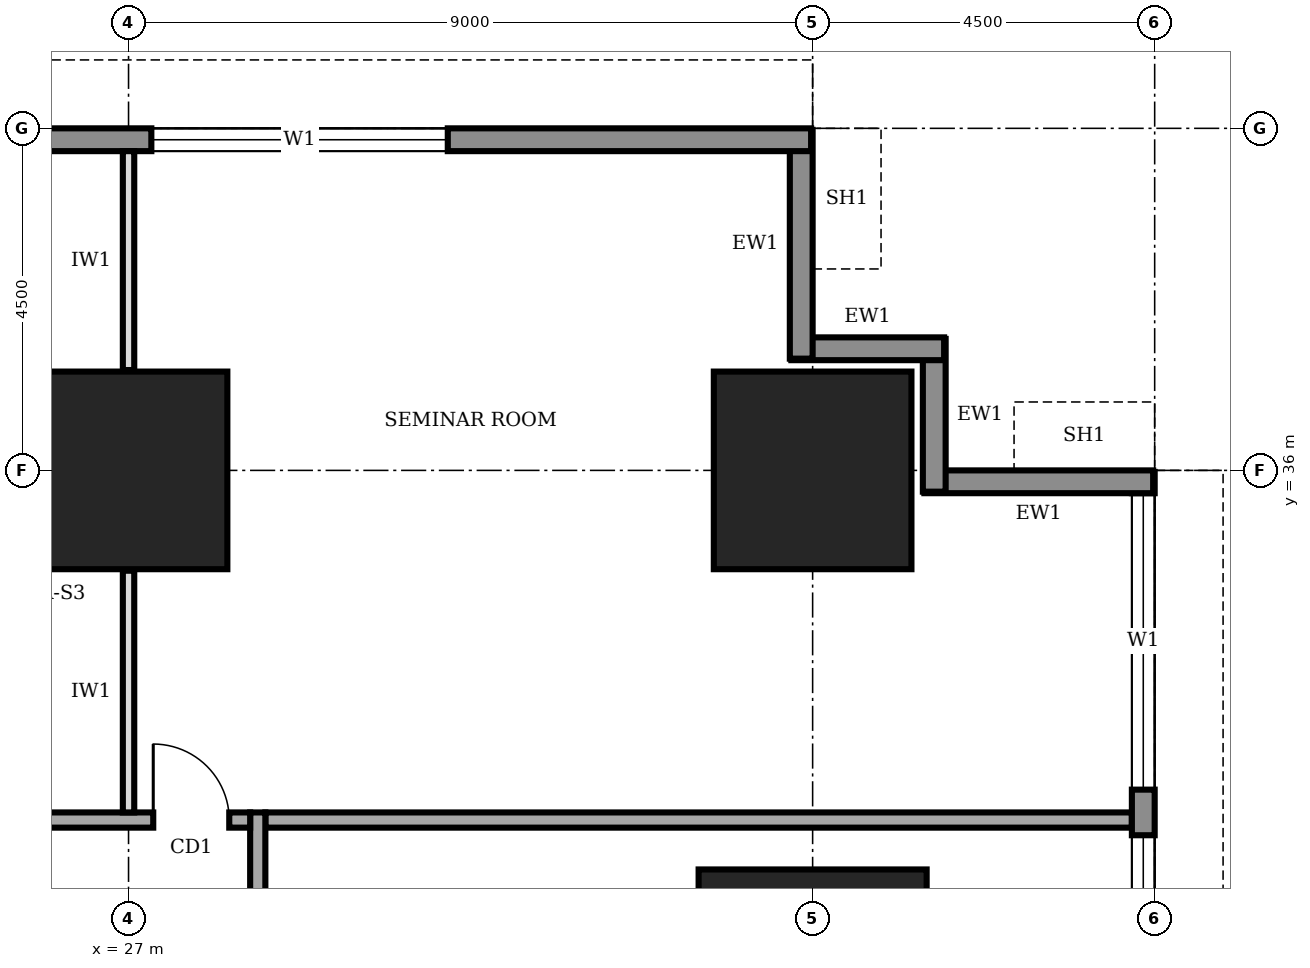
"""IFC4 building model, lengths in metres.
Left out: names, types, materials, properties, quantities, classifications, styles, units other than length and angle.
Written with IfcOpenShell. Run it as: python <this file> out.ifc"""

import sys

from ifc_helpers import new_model, si_unit, direction, frame, frame_2d, origin, origin_2d, place, context, subcontext, project, spatial, rectangle, extrude, element, fill, save


model = new_model("IFC4")
c1 = context("Model", 3, precision=1e-05, world=origin(), true_north=direction((0.0, 1.0)))
c2 = subcontext(c1, "Body", "Model", "MODEL_VIEW")
j1 = project(units=[si_unit("LENGTHUNIT", "METRE"), si_unit("PLANEANGLEUNIT", "RADIAN")], contexts=[c1])
p1 = place(None, origin())
s1 = spatial("IfcSite", under=j1, at=p1, CompositionType="ELEMENT")
p2 = place(p1, origin())
s2 = spatial("IfcBuilding", under=s1, at=p2, CompositionType="ELEMENT")
p3 = place(p2, frame((0.0, 0.0, 25.0)))
s3 = spatial("IfcBuildingStorey", under=s2, at=p3, CompositionType="ELEMENT", Elevation=25.0)
p4 = place(p3, frame((36.0, 29.25, 0.0), z_axis=(0.0, 0.0, 1.0), x_axis=(1.0, 0.0, 0.0)))
e1 = element("IfcColumn", 1, at=p4, inside=s3, PredefinedType="COLUMN", context=c2, shape_type="SweptSolid", body=[
    extrude(rectangle(XDim=3.0, YDim=3.0, at=origin_2d()), origin(), (0.0, 0.0, 1.0), 4.0),
])
for number, where, z_axis, x_axis in (
    (2, (27.0, 36.0, 0.0), (0.0, 0.0, 1.0), (1.0, 0.0, 0.0)),
    (3, (36.0, 36.0, 0.0), (0.0, 0.0, 1.0), (1.0, 0.0, 0.0)),
):
    element("IfcColumn", number, at=place(p3, frame(where, z_axis=z_axis, x_axis=x_axis)), inside=s3, PredefinedType="COLUMN", context=c2, shape_type="SweptSolid", body=[
        extrude(rectangle(XDim=2.6, YDim=2.6, at=origin_2d()), origin(), (0.0, 0.0, 1.0), 4.0),
    ])
p5 = place(p3, frame((40.35, 4.52, 0.0), z_axis=(0.0, 0.0, 1.0), x_axis=(0.0, 1.0, 0.0)))
e4 = element("IfcWall", 4, at=p5, inside=s3, PredefinedType="STANDARD", context=c2, shape_type="SweptSolid", body=[
    extrude(rectangle(XDim=31.46, YDim=0.3, at=frame_2d((15.73, 0.0))), origin(), (0.0, 0.0, 1.0), 3.75),
])
p6 = place(p5, frame((4.78, 0.0, 0.9)))
e5 = element("IfcOpeningElement", 5, at=p6, cuts=e4, PredefinedType="OPENING", context=c2, shape_type="SweptSolid", body=[
    extrude(rectangle(XDim=3.9, YDim=2.2, at=frame_2d((1.95, 1.1))), frame((0.0, 0.16, 0.0), z_axis=(0.0, -1.0, 0.0), x_axis=(1.0, 0.0, 0.0)), (0.0, 0.0, 1.0), 0.32),
])
p7 = place(p5, frame((9.28, 0.0, 0.9)))
e6 = element("IfcOpeningElement", 6, at=p7, cuts=e4, PredefinedType="OPENING", context=c2, shape_type="SweptSolid", body=[
    extrude(rectangle(XDim=3.9, YDim=2.2, at=frame_2d((1.95, 1.1))), frame((0.0, 0.16, 0.0), z_axis=(0.0, -1.0, 0.0), x_axis=(1.0, 0.0, 0.0)), (0.0, 0.0, 1.0), 0.32),
])
p8 = place(p5, frame((13.78, 0.0, 0.9)))
e7 = element("IfcOpeningElement", 7, at=p8, cuts=e4, PredefinedType="OPENING", context=c2, shape_type="SweptSolid", body=[
    extrude(rectangle(XDim=3.9, YDim=2.2, at=frame_2d((1.95, 1.1))), frame((0.0, 0.16, 0.0), z_axis=(0.0, -1.0, 0.0), x_axis=(1.0, 0.0, 0.0)), (0.0, 0.0, 1.0), 0.32),
])
p9 = place(p5, frame((18.28, 0.0, 0.9)))
e8 = element("IfcOpeningElement", 8, at=p9, cuts=e4, PredefinedType="OPENING", context=c2, shape_type="SweptSolid", body=[
    extrude(rectangle(XDim=3.9, YDim=2.2, at=frame_2d((1.95, 1.1))), frame((0.0, 0.16, 0.0), z_axis=(0.0, -1.0, 0.0), x_axis=(1.0, 0.0, 0.0)), (0.0, 0.0, 1.0), 0.32),
])
p10 = place(p5, frame((22.78, 0.0, 0.9)))
e9 = element("IfcOpeningElement", 9, at=p10, cuts=e4, PredefinedType="OPENING", context=c2, shape_type="SweptSolid", body=[
    extrude(rectangle(XDim=3.9, YDim=2.2, at=frame_2d((1.95, 1.1))), frame((0.0, 0.16, 0.0), z_axis=(0.0, -1.0, 0.0), x_axis=(1.0, 0.0, 0.0)), (0.0, 0.0, 1.0), 0.32),
])
p11 = place(p5, frame((27.28, 0.0, 0.9)))
e10 = element("IfcOpeningElement", 10, at=p11, cuts=e4, PredefinedType="OPENING", context=c2, shape_type="SweptSolid", body=[
    extrude(rectangle(XDim=3.9, YDim=2.2, at=frame_2d((1.95, 1.1))), frame((0.0, 0.16, 0.0), z_axis=(0.0, -1.0, 0.0), x_axis=(1.0, 0.0, 0.0)), (0.0, 0.0, 1.0), 0.32),
])
p12 = place(p3, frame((40.48, 35.85, 0.0), z_axis=(0.0, 0.0, 1.0), x_axis=(-1.0, 0.0, 0.0)))
e11 = element("IfcWall", 11, at=p12, inside=s3, PredefinedType="STANDARD", context=c2, shape_type="SweptSolid", body=[
    extrude(rectangle(XDim=3.01, YDim=0.3, at=frame_2d((1.505, 0.0))), origin(), (0.0, 0.0, 1.0), 2.85),
])
for number, where, z_axis, x_axis in (
    (12, (37.6, 35.72, 0.0), (0.0, 0.0, 1.0), (0.0, 1.0, 0.0)),
    (13, (37.73, 37.6, 0.0), (0.0, 0.0, 1.0), (-1.0, 0.0, 0.0)),
):
    element("IfcWall", number, at=place(p3, frame(where, z_axis=z_axis, x_axis=x_axis)), inside=s3, PredefinedType="STANDARD", context=c2, shape_type="SweptSolid", body=[
        extrude(rectangle(XDim=2.01, YDim=0.3, at=frame_2d((1.005, 0.0))), origin(), (0.0, 0.0, 1.0), 3.75),
    ])
p13 = place(p3, frame((35.85, 37.47, 0.0), z_axis=(0.0, 0.0, 1.0), x_axis=(0.0, 1.0, 0.0)))
e14 = element("IfcWall", 14, at=p13, inside=s3, PredefinedType="STANDARD", context=c2, shape_type="SweptSolid", body=[
    extrude(rectangle(XDim=3.01, YDim=0.3, at=frame_2d((1.505, 0.0))), origin(), (0.0, 0.0, 1.0), 2.85),
])
p14 = place(p3, frame((35.98, 40.35, 0.0), z_axis=(0.0, 0.0, 1.0), x_axis=(-1.0, 0.0, 0.0)))
e15 = element("IfcWall", 15, at=p14, inside=s3, PredefinedType="STANDARD", context=c2, shape_type="SweptSolid", body=[
    extrude(rectangle(XDim=31.46, YDim=0.3, at=frame_2d((15.73, 0.0))), origin(), (0.0, 0.0, 1.0), 3.75),
])
p15 = place(p14, frame((27.28, 0.0, 0.9)))
e16 = element("IfcOpeningElement", 16, at=p15, cuts=e15, PredefinedType="OPENING", context=c2, shape_type="SweptSolid", body=[
    extrude(rectangle(XDim=3.9, YDim=2.2, at=frame_2d((1.95, 1.1))), frame((0.0, 0.16, 0.0), z_axis=(0.0, -1.0, 0.0), x_axis=(1.0, 0.0, 0.0)), (0.0, 0.0, 1.0), 0.32),
])
p16 = place(p14, frame((22.78, 0.0, 0.9)))
e17 = element("IfcOpeningElement", 17, at=p16, cuts=e15, PredefinedType="OPENING", context=c2, shape_type="SweptSolid", body=[
    extrude(rectangle(XDim=3.9, YDim=2.2, at=frame_2d((1.95, 1.1))), frame((0.0, 0.16, 0.0), z_axis=(0.0, -1.0, 0.0), x_axis=(1.0, 0.0, 0.0)), (0.0, 0.0, 1.0), 0.32),
])
p17 = place(p14, frame((4.78, 0.0, 0.9)))
e18 = element("IfcOpeningElement", 18, at=p17, cuts=e15, PredefinedType="OPENING", context=c2, shape_type="SweptSolid", body=[
    extrude(rectangle(XDim=3.9, YDim=2.2, at=frame_2d((1.95, 1.1))), frame((0.0, 0.16, 0.0), z_axis=(0.0, -1.0, 0.0), x_axis=(1.0, 0.0, 0.0)), (0.0, 0.0, 1.0), 0.32),
])
p18 = place(p3, frame((28.7, 7.7, 0.0), z_axis=(0.0, 0.0, 1.0), x_axis=(0.0, 1.0, 0.0)))
e19 = element("IfcWall", 19, at=p18, inside=s3, PredefinedType="SOLIDWALL", context=c2, shape_type="SweptSolid", body=[
    extrude(rectangle(XDim=23.8, YDim=0.2, at=frame_2d((11.9, 0.0))), origin(), (0.0, 0.0, 1.0), 3.75),
])
p19 = place(p18, frame((2.3, 0.0, 0.0)))
e20 = element("IfcOpeningElement", 20, at=p19, cuts=e19, PredefinedType="OPENING", context=c2, shape_type="SweptSolid", body=[
    extrude(rectangle(XDim=1.0, YDim=2.1, at=frame_2d((0.5, 1.05))), frame((0.0, 0.11, 0.0), z_axis=(0.0, -1.0, 0.0), x_axis=(1.0, 0.0, 0.0)), (0.0, 0.0, 1.0), 0.22),
])
p20 = place(p18, frame((7.55, 0.0, 0.0)))
e21 = element("IfcOpeningElement", 21, at=p20, cuts=e19, PredefinedType="OPENING", context=c2, shape_type="SweptSolid", body=[
    extrude(rectangle(XDim=1.0, YDim=2.1, at=frame_2d((0.5, 1.05))), frame((0.0, 0.11, 0.0), z_axis=(0.0, -1.0, 0.0), x_axis=(1.0, 0.0, 0.0)), (0.0, 0.0, 1.0), 0.22),
])
p21 = place(p18, frame((12.05, 0.0, 0.0)))
e22 = element("IfcOpeningElement", 22, at=p21, cuts=e19, PredefinedType="OPENING", context=c2, shape_type="SweptSolid", body=[
    extrude(rectangle(XDim=1.0, YDim=2.1, at=frame_2d((0.5, 1.05))), frame((0.0, 0.11, 0.0), z_axis=(0.0, -1.0, 0.0), x_axis=(1.0, 0.0, 0.0)), (0.0, 0.0, 1.0), 0.22),
])
p22 = place(p18, frame((18.4, 0.0, 0.0)))
e23 = element("IfcOpeningElement", 23, at=p22, cuts=e19, PredefinedType="OPENING", context=c2, shape_type="SweptSolid", body=[
    extrude(rectangle(XDim=1.8, YDim=2.1, at=frame_2d((0.9, 1.05))), frame((0.0, 0.11, 0.0), z_axis=(0.0, -1.0, 0.0), x_axis=(1.0, 0.0, 0.0)), (0.0, 0.0, 1.0), 0.22),
])
p23 = place(p3, frame((28.6, 31.4, 0.0), z_axis=(0.0, 0.0, 1.0), x_axis=(-1.0, 0.0, 0.0)))
e24 = element("IfcWall", 24, at=p23, inside=s3, PredefinedType="SOLIDWALL", context=c2, shape_type="SweptSolid", body=[
    extrude(rectangle(XDim=16.9, YDim=0.2, at=frame_2d((8.45, 0.0))), origin(), (0.0, 0.0, 1.0), 3.75),
])
p24 = place(p23, frame((15.425, 0.0, 0.0)))
e25 = element("IfcOpeningElement", 25, at=p24, cuts=e24, PredefinedType="OPENING", context=c2, shape_type="SweptSolid", body=[
    extrude(rectangle(XDim=1.0, YDim=2.1, at=frame_2d((0.5, 1.05))), frame((0.0, 0.11, 0.0), z_axis=(0.0, -1.0, 0.0), x_axis=(1.0, 0.0, 0.0)), (0.0, 0.0, 1.0), 0.22),
])
p25 = place(p23, frame((12.35, 0.0, 0.0)))
e26 = element("IfcOpeningElement", 26, at=p25, cuts=e24, PredefinedType="OPENING", context=c2, shape_type="SweptSolid", body=[
    extrude(rectangle(XDim=1.0, YDim=2.1, at=frame_2d((0.5, 1.05))), frame((0.0, 0.11, 0.0), z_axis=(0.0, -1.0, 0.0), x_axis=(1.0, 0.0, 0.0)), (0.0, 0.0, 1.0), 0.22),
])
p26 = place(p23, frame((5.6, 0.0, 0.0)))
e27 = element("IfcOpeningElement", 27, at=p26, cuts=e24, PredefinedType="OPENING", context=c2, shape_type="SweptSolid", body=[
    extrude(rectangle(XDim=1.0, YDim=2.1, at=frame_2d((0.5, 1.05))), frame((0.0, 0.11, 0.0), z_axis=(0.0, -1.0, 0.0), x_axis=(1.0, 0.0, 0.0)), (0.0, 0.0, 1.0), 0.22),
])
p27 = place(p23, frame((0.275, 0.0, 0.0)))
e28 = element("IfcOpeningElement", 28, at=p27, cuts=e24, PredefinedType="OPENING", context=c2, shape_type="SweptSolid", body=[
    extrude(rectangle(XDim=1.0, YDim=2.1, at=frame_2d((0.5, 1.05))), frame((0.0, 0.11, 0.0), z_axis=(0.0, -1.0, 0.0), x_axis=(1.0, 0.0, 0.0)), (0.0, 0.0, 1.0), 0.22),
])
p28 = place(p3, frame((28.8, 31.4, 0.0), z_axis=(0.0, 0.0, 1.0), x_axis=(1.0, 0.0, 0.0)))
e29 = element("IfcWall", 29, at=p28, inside=s3, PredefinedType="SOLIDWALL", context=c2, shape_type="SweptSolid", body=[
    extrude(rectangle(XDim=11.4, YDim=0.2, at=frame_2d((5.7, 0.0))), origin(), (0.0, 0.0, 1.0), 3.75),
])
p29 = place(p3, frame((27.0, 31.5, 0.0), z_axis=(0.0, 0.0, 1.0), x_axis=(0.0, 1.0, 0.0)))
e30 = element("IfcWall", 30, at=p29, inside=s3, PredefinedType="PARTITIONING", context=c2, shape_type="SweptSolid", body=[
    extrude(rectangle(XDim=3.18, YDim=0.15, at=frame_2d((1.59, 0.0))), origin(), (0.0, 0.0, 1.0), 2.85),
])
p30 = place(p3, frame((27.0, 37.32, 0.0), z_axis=(0.0, 0.0, 1.0), x_axis=(0.0, 1.0, 0.0)))
e31 = element("IfcWall", 31, at=p30, inside=s3, PredefinedType="PARTITIONING", context=c2, shape_type="SweptSolid", body=[
    extrude(rectangle(XDim=2.88, YDim=0.15, at=frame_2d((1.44, 0.0))), origin(), (0.0, 0.0, 1.0), 2.85),
])
p31 = place(p10, origin())
e32 = element("IfcWindow", 32, at=p31, inside=s3, PartitioningType="SINGLE_PANEL", PredefinedType="WINDOW", context=c2, shape_type="SweptSolid", body=[
    extrude(rectangle(XDim=3.9, YDim=2.2, at=frame_2d((1.95, 1.1))), frame((0.0, 0.03, 0.0), z_axis=(0.0, -1.0, 0.0), x_axis=(1.0, 0.0, 0.0)), (0.0, 0.0, 1.0), 0.06),
])
fill(e9, e32)
p32 = place(p11, origin())
e33 = element("IfcWindow", 33, at=p32, inside=s3, PartitioningType="SINGLE_PANEL", PredefinedType="WINDOW", context=c2, shape_type="SweptSolid", body=[
    extrude(rectangle(XDim=3.9, YDim=2.2, at=frame_2d((1.95, 1.1))), frame((0.0, 0.03, 0.0), z_axis=(0.0, -1.0, 0.0), x_axis=(1.0, 0.0, 0.0)), (0.0, 0.0, 1.0), 0.06),
])
fill(e10, e33)
p33 = place(p17, origin())
e34 = element("IfcWindow", 34, at=p33, inside=s3, PartitioningType="SINGLE_PANEL", PredefinedType="WINDOW", context=c2, shape_type="SweptSolid", body=[
    extrude(rectangle(XDim=3.9, YDim=2.2, at=frame_2d((1.95, 1.1))), frame((0.0, 0.03, 0.0), z_axis=(0.0, -1.0, 0.0), x_axis=(1.0, 0.0, 0.0)), (0.0, 0.0, 1.0), 0.06),
])
fill(e18, e34)
p34 = place(p27, frame((1.0, 0.0, 0.0), z_axis=(0.0, 0.0, 1.0), x_axis=(-1.0, 0.0, 0.0)))
e35 = element("IfcDoor", 35, at=p34, inside=s3, OperationType="SINGLE_SWING_LEFT", PredefinedType="DOOR", context=c2, shape_type="SweptSolid", body=[
    extrude(rectangle(XDim=1.0, YDim=2.1, at=frame_2d((0.5, 1.05))), frame((0.0, 0.025, 0.0), z_axis=(0.0, -1.0, 0.0), x_axis=(1.0, 0.0, 0.0)), (0.0, 0.0, 1.0), 0.05),
])
fill(e28, e35)
save(model, sys.argv[1])
